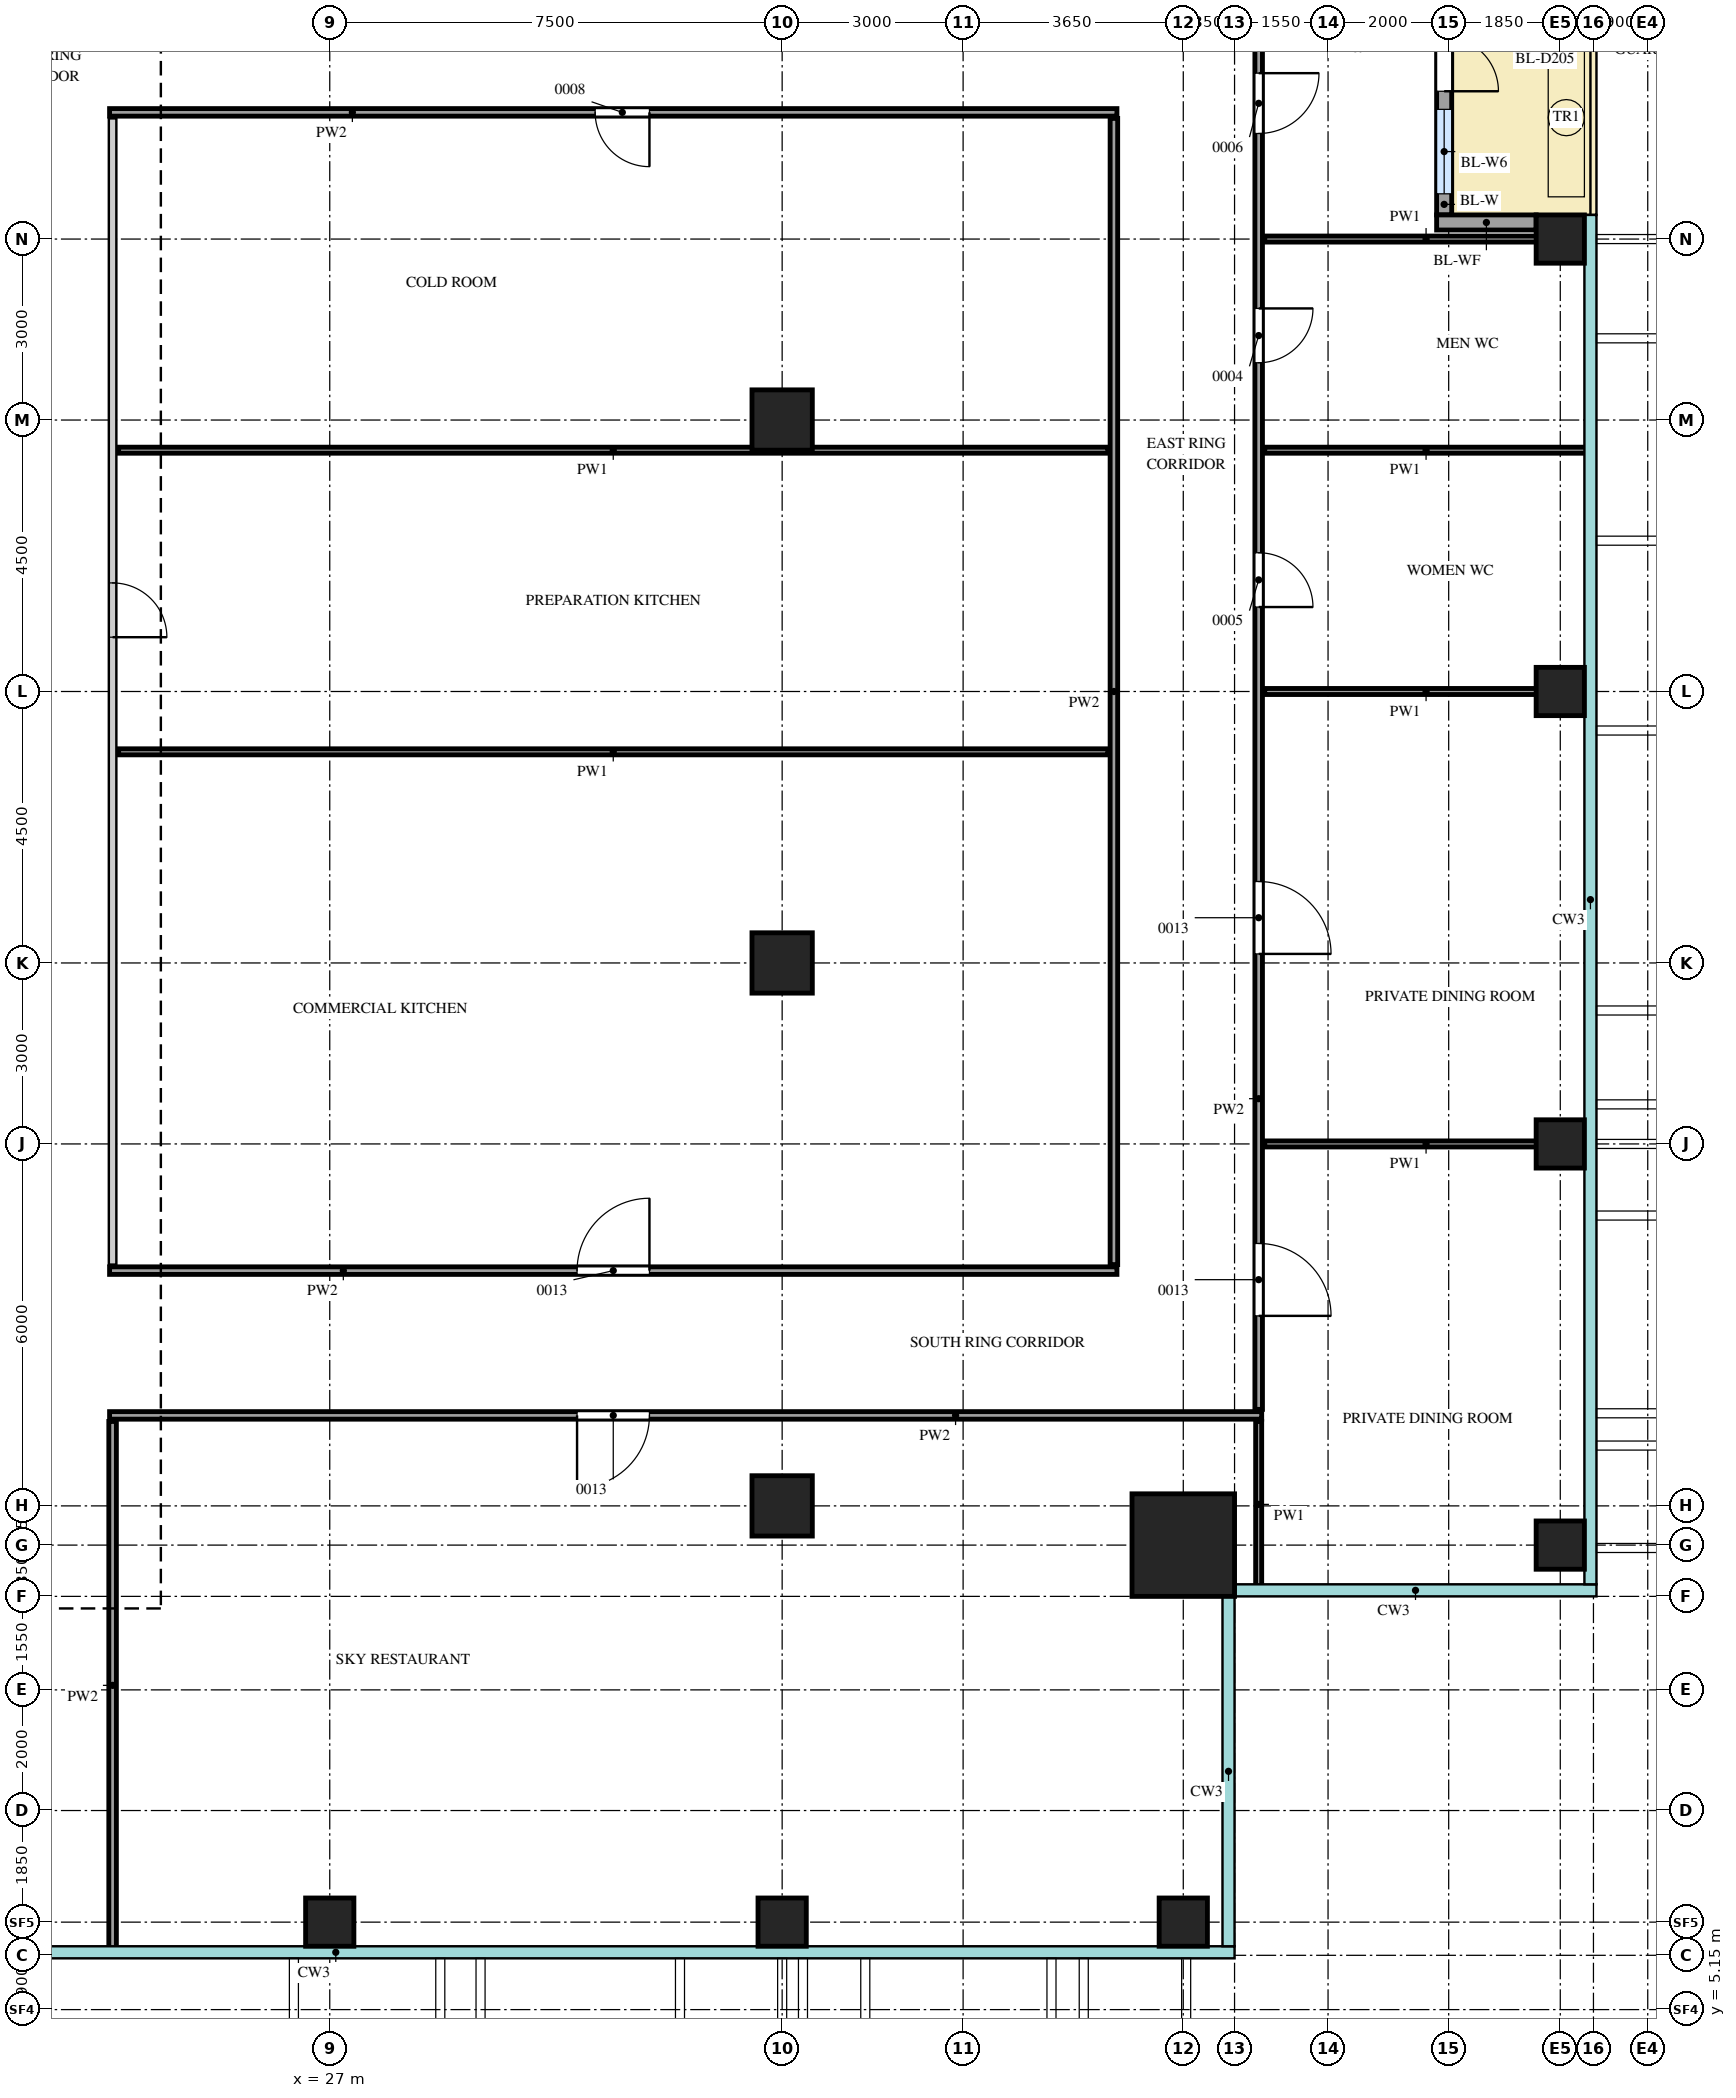
"""IFC4 building model, lengths in metres.
Left out: names, types, materials, properties, quantities, classifications, styles, units other than length and angle.
Written with IfcOpenShell. Run it as: python <this file> out.ifc"""

import sys

from ifc_helpers import new_model, si_unit, direction, frame, frame_2d, origin, origin_2d, place, context, subcontext, project, spatial, rectangle, extrude, source, transform, mapped, element, fill, save


model = new_model("IFC4")
c1 = context("Model", 3, precision=1e-05, world=origin(), true_north=direction((0.0, 1.0)))
c2 = subcontext(c1, "Body", "Model", "MODEL_VIEW")
j1 = project(units=[si_unit("LENGTHUNIT", "METRE"), si_unit("PLANEANGLEUNIT", "RADIAN")], contexts=[c1])
p1 = place(None, origin())
s1 = spatial("IfcSite", under=j1, at=p1, CompositionType="ELEMENT")
p2 = place(p1, origin())
s2 = spatial("IfcBuilding", under=s1, at=p2, CompositionType="ELEMENT")
p3 = place(p2, frame((0.0, 0.0, 306.2)))
s3 = spatial("IfcBuildingStorey", under=s2, at=p3, CompositionType="ELEMENT", Elevation=306.2)
m1 = source(origin(), c2, "Body", "SweptSolid", [
    extrude(rectangle(XDim=1.7, YDim=1.7, at=origin_2d()), origin(), (0.0, 0.0, 1.0), 3.75),
])
p4 = place(p3, frame((41.15, 12.85, 0.0), z_axis=(0.0, 0.0, 1.0), x_axis=(1.0, 0.0, 0.0)))
e1 = element("IfcColumn", 1, at=p4, inside=s3, PredefinedType="COLUMN", context=c2, shape_type="MappedRepresentation", body=[
    mapped(m1, transform((0.0, 0.0, 0.0))),
])
m2 = source(origin(), c2, "Body", "SweptSolid", [
    extrude(rectangle(XDim=0.8, YDim=0.8, at=origin_2d()), origin(), (0.0, 0.0, 1.0), 3.75),
])
for number, where, z_axis, x_axis in (
    (2, (27.0, 6.6, 0.0), (0.0, 0.0, 1.0), (1.0, 0.0, 0.0)),
    (3, (34.5, 6.6, 0.0), (0.0, 0.0, 1.0), (1.0, 0.0, 0.0)),
    (4, (41.15, 6.6, 0.0), (0.0, 0.0, 1.0), (1.0, 0.0, 0.0)),
    (5, (47.4, 12.85, 0.0), (0.0, 0.0, 1.0), (1.0, 0.0, 0.0)),
    (6, (47.4, 19.5, 0.0), (0.0, 0.0, 1.0), (1.0, 0.0, 0.0)),
    (7, (47.4, 27.0, 0.0), (0.0, 0.0, 1.0), (1.0, 0.0, 0.0)),
    (8, (47.4, 34.5, 0.0), (0.0, 0.0, 1.0), (1.0, 0.0, 0.0)),
):
    element("IfcColumn", number, at=place(p3, frame(where, z_axis=z_axis, x_axis=x_axis)), inside=s3, PredefinedType="COLUMN", context=c2, shape_type="MappedRepresentation", body=[
        mapped(m2, transform((0.0, 0.0, 0.0))),
    ])
m3 = source(origin(), c2, "Body", "SweptSolid", [
    extrude(rectangle(XDim=1.0, YDim=1.0, at=origin_2d()), origin(), (0.0, 0.0, 1.0), 3.75),
])
for number, where, z_axis, x_axis in (
    (9, (34.5, 13.5, 0.0), (0.0, 0.0, 1.0), (1.0, 0.0, 0.0)),
    (10, (34.5, 22.5, 0.0), (0.0, 0.0, 1.0), (1.0, 0.0, 0.0)),
    (11, (34.5, 31.5, 0.0), (0.0, 0.0, 1.0), (1.0, 0.0, 0.0)),
):
    element("IfcColumn", number, at=place(p3, frame(where, z_axis=z_axis, x_axis=x_axis)), inside=s3, PredefinedType="COLUMN", context=c2, shape_type="MappedRepresentation", body=[
        mapped(m3, transform((0.0, 0.0, 0.0))),
    ])
m4 = source(origin(), c2, "Body", "SweptSolid", [
    extrude(rectangle(XDim=5.85, YDim=0.25, at=frame_2d((2.925, 0.0))), origin(), (0.0, 0.0, 1.0), 3.75),
])
p5 = place(p3, frame((45.475, 34.9, 0.0), z_axis=(0.0, 0.0, 1.0), x_axis=(0.0, 1.0, 0.0)))
e12 = element("IfcWall", 12, at=p5, inside=s3, PredefinedType="SOLIDWALL", context=c2, shape_type="MappedRepresentation", body=[
    mapped(m4, transform((0.0, 0.0, 0.0))),
])
m5 = source(origin(), c2, "Body", "SweptSolid", [
    extrude(rectangle(XDim=1.4, YDim=2.4, at=frame_2d((0.7, 1.2))), frame((0.0, 0.135, 0.0), z_axis=(0.0, -1.0, 0.0), x_axis=(1.0, 0.0, 0.0)), (0.0, 0.0, 1.0), 0.27),
])
p6 = place(p5, frame((0.35, 0.0, 0.0)))
e13 = element("IfcOpeningElement", 13, at=p6, cuts=e12, PredefinedType="OPENING", context=c2, shape_type="MappedRepresentation", body=[
    mapped(m5, transform((0.0, 0.0, 0.0))),
])
p7 = place(p5, frame((4.15, 0.0, 0.0)))
e14 = element("IfcOpeningElement", 14, at=p7, cuts=e12, PredefinedType="OPENING", context=c2, shape_type="MappedRepresentation", body=[
    mapped(m5, transform((0.0, 0.0, 0.0))),
])
m6 = source(origin(), c2, "Body", "SweptSolid", [
    extrude(rectangle(XDim=1.8, YDim=2.4, at=frame_2d((0.9, 1.2))), frame((0.0, 0.135, 0.0), z_axis=(0.0, -1.0, 0.0), x_axis=(1.0, 0.0, 0.0)), (0.0, 0.0, 1.0), 0.27),
])
p8 = place(p5, frame((2.05, 0.0, 0.0)))
e15 = element("IfcOpeningElement", 15, at=p8, cuts=e12, PredefinedType="OPENING", context=c2, shape_type="MappedRepresentation", body=[
    mapped(m6, transform((0.0, 0.0, 0.0))),
])
m7 = source(origin(), c2, "Body", "SweptSolid", [
    extrude(rectangle(XDim=1.65, YDim=0.25, at=frame_2d((0.825, 0.0))), origin(), (0.0, 0.0, 1.0), 3.45),
])
p9 = place(p3, frame((47.0, 34.775, 0.0), z_axis=(0.0, 0.0, 1.0), x_axis=(-1.0, 0.0, 0.0)))
e16 = element("IfcWall", 16, at=p9, inside=s3, PredefinedType="SOLIDWALL", context=c2, shape_type="MappedRepresentation", body=[
    mapped(m7, transform((0.0, 0.0, 0.0))),
])
m8 = source(origin(), c2, "Body", "SweptSolid", [
    extrude(rectangle(XDim=8.75, YDim=0.125, at=frame_2d((4.375, 0.0))), origin(), (0.0, 0.0, 1.0), 3.8),
])
p10 = place(p3, frame((23.4, 6.15, 0.0), z_axis=(0.0, 0.0, 1.0), x_axis=(0.0, 1.0, 0.0)))
e17 = element("IfcWall", 17, at=p10, inside=s3, PredefinedType="PARTITIONING", context=c2, shape_type="MappedRepresentation", body=[
    mapped(m8, transform((0.0, 0.0, 0.0))),
])
m9 = source(origin(), c2, "Body", "SweptSolid", [
    extrude(rectangle(XDim=2.75, YDim=0.1, at=frame_2d((1.375, 0.0))), origin(), (0.0, 0.0, 1.0), 3.8),
])
p11 = place(p3, frame((42.4, 12.15, 0.0), z_axis=(0.0, 0.0, 1.0), x_axis=(0.0, 1.0, 0.0)))
e18 = element("IfcWall", 18, at=p11, inside=s3, PredefinedType="PARTITIONING", context=c2, shape_type="MappedRepresentation", body=[
    mapped(m9, transform((0.0, 0.0, 0.0))),
])
m10 = source(origin(), c2, "Body", "SweptSolid", [
    extrude(rectangle(XDim=19.1, YDim=0.125, at=frame_2d((9.55, 0.0))), origin(), (0.0, 0.0, 1.0), 3.8),
])
p12 = place(p3, frame((23.35, 15.0, 0.0), z_axis=(0.0, 0.0, 1.0), x_axis=(1.0, 0.0, 0.0)))
e19 = element("IfcWall", 19, at=p12, inside=s3, PredefinedType="PARTITIONING", context=c2, shape_type="MappedRepresentation", body=[
    mapped(m10, transform((0.0, 0.0, 0.0))),
])
m11 = source(origin(), c2, "Body", "SweptSolid", [
    extrude(rectangle(XDim=1.2, YDim=2.1, at=frame_2d((0.6, 1.05))), frame((0.0, 0.073, 0.0), z_axis=(0.0, -1.0, 0.0), x_axis=(1.0, 0.0, 0.0)), (0.0, 0.0, 1.0), 0.145),
])
p13 = place(p12, frame((7.75, 0.0, 0.0)))
e20 = element("IfcOpeningElement", 20, at=p13, cuts=e19, PredefinedType="OPENING", context=c2, shape_type="MappedRepresentation", body=[
    mapped(m11, transform((0.0, 0.0, 0.0))),
])
m12 = source(origin(), c2, "Body", "SweptSolid", [
    extrude(rectangle(XDim=23.8, YDim=0.125, at=frame_2d((11.9, 0.0))), origin(), (0.0, 0.0, 1.0), 3.8),
])
p14 = place(p3, frame((42.4, 15.1, 0.0), z_axis=(0.0, 0.0, 1.0), x_axis=(0.0, 1.0, 0.0)))
e21 = element("IfcWall", 21, at=p14, inside=s3, PredefinedType="PARTITIONING", context=c2, shape_type="MappedRepresentation", body=[
    mapped(m12, transform((0.0, 0.0, 0.0))),
])
p15 = place(p14, frame((1.55, 0.0, 0.0)))
e22 = element("IfcOpeningElement", 22, at=p15, cuts=e21, PredefinedType="OPENING", context=c2, shape_type="MappedRepresentation", body=[
    mapped(m11, transform((0.0, 0.0, 0.0))),
])
p16 = place(p14, frame((7.55, 0.0, 0.0)))
e23 = element("IfcOpeningElement", 23, at=p16, cuts=e21, PredefinedType="OPENING", context=c2, shape_type="MappedRepresentation", body=[
    mapped(m11, transform((0.0, 0.0, 0.0))),
])
m13 = source(origin(), c2, "Body", "SweptSolid", [
    extrude(rectangle(XDim=0.9, YDim=2.1, at=frame_2d((0.45, 1.05))), frame((0.0, 0.073, 0.0), z_axis=(0.0, -1.0, 0.0), x_axis=(1.0, 0.0, 0.0)), (0.0, 0.0, 1.0), 0.145),
])
p17 = place(p14, frame((13.3, 0.0, 0.0)))
e24 = element("IfcOpeningElement", 24, at=p17, cuts=e21, PredefinedType="OPENING", context=c2, shape_type="MappedRepresentation", body=[
    mapped(m13, transform((0.0, 0.0, 0.0))),
])
p18 = place(p14, frame((17.35, 0.0, 0.0)))
e25 = element("IfcOpeningElement", 25, at=p18, cuts=e21, PredefinedType="OPENING", context=c2, shape_type="MappedRepresentation", body=[
    mapped(m13, transform((0.0, 0.0, 0.0))),
])
m14 = source(origin(), c2, "Body", "SweptSolid", [
    extrude(rectangle(XDim=1.0, YDim=2.1, at=frame_2d((0.5, 1.05))), frame((0.0, 0.073, 0.0), z_axis=(0.0, -1.0, 0.0), x_axis=(1.0, 0.0, 0.0)), (0.0, 0.0, 1.0), 0.145),
])
p19 = place(p14, frame((21.15, 0.0, 0.0)))
e26 = element("IfcOpeningElement", 26, at=p19, cuts=e21, PredefinedType="OPENING", context=c2, shape_type="MappedRepresentation", body=[
    mapped(m14, transform((0.0, 0.0, 0.0))),
])
m15 = source(origin(), c2, "Body", "SweptSolid", [
    extrude(rectangle(XDim=16.7, YDim=0.125, at=frame_2d((8.35, 0.0))), origin(), (0.0, 0.0, 1.0), 3.8),
])
p20 = place(p3, frame((23.35, 17.4, 0.0), z_axis=(0.0, 0.0, 1.0), x_axis=(1.0, 0.0, 0.0)))
e27 = element("IfcWall", 27, at=p20, inside=s3, PredefinedType="PARTITIONING", context=c2, shape_type="MappedRepresentation", body=[
    mapped(m15, transform((0.0, 0.0, 0.0))),
])
p21 = place(p20, frame((7.75, 0.0, 0.0)))
e28 = element("IfcOpeningElement", 28, at=p21, cuts=e27, PredefinedType="OPENING", context=c2, shape_type="MappedRepresentation", body=[
    mapped(m11, transform((0.0, 0.0, 0.0))),
])
m16 = source(origin(), c2, "Body", "SweptSolid", [
    extrude(rectangle(XDim=19.0, YDim=0.125, at=frame_2d((9.5, 0.0))), origin(), (0.0, 0.0, 1.0), 3.8),
])
p22 = place(p3, frame((23.4, 17.5, 0.0), z_axis=(0.0, 0.0, 1.0), x_axis=(0.0, 1.0, 0.0)))
e29 = element("IfcWall", 29, at=p22, inside=s3, PredefinedType="PARTITIONING", context=c2, shape_type="MappedRepresentation", body=[
    mapped(m16, transform((0.0, 0.0, 0.0))),
])
p23 = place(p22, frame((10.4, 0.0, 0.0)))
e30 = element("IfcOpeningElement", 30, at=p23, cuts=e29, PredefinedType="OPENING", context=c2, shape_type="MappedRepresentation", body=[
    mapped(m13, transform((0.0, 0.0, 0.0))),
])
p24 = place(p3, frame((40.0, 17.5, 0.0), z_axis=(0.0, 0.0, 1.0), x_axis=(0.0, 1.0, 0.0)))
e31 = element("IfcWall", 31, at=p24, inside=s3, PredefinedType="PARTITIONING", context=c2, shape_type="MappedRepresentation", body=[
    mapped(m16, transform((0.0, 0.0, 0.0))),
])
m17 = source(origin(), c2, "Body", "SweptSolid", [
    extrude(rectangle(XDim=5.35, YDim=0.1, at=frame_2d((2.675, 0.0))), origin(), (0.0, 0.0, 1.0), 3.8),
])
p25 = place(p3, frame((42.5, 19.5, 0.0), z_axis=(0.0, 0.0, 1.0), x_axis=(1.0, 0.0, 0.0)))
e32 = element("IfcWall", 32, at=p25, inside=s3, PredefinedType="PARTITIONING", context=c2, shape_type="MappedRepresentation", body=[
    mapped(m17, transform((0.0, 0.0, 0.0))),
])
m18 = source(origin(), c2, "Body", "SweptSolid", [
    extrude(rectangle(XDim=16.4, YDim=0.1, at=frame_2d((8.2, 0.0))), origin(), (0.0, 0.0, 1.0), 3.8),
])
p26 = place(p3, frame((23.5, 26.0, 0.0), z_axis=(0.0, 0.0, 1.0), x_axis=(1.0, 0.0, 0.0)))
e33 = element("IfcWall", 33, at=p26, inside=s3, PredefinedType="PARTITIONING", context=c2, shape_type="MappedRepresentation", body=[
    mapped(m18, transform((0.0, 0.0, 0.0))),
])
p27 = place(p3, frame((42.5, 27.0, 0.0), z_axis=(0.0, 0.0, 1.0), x_axis=(1.0, 0.0, 0.0)))
e34 = element("IfcWall", 34, at=p27, inside=s3, PredefinedType="PARTITIONING", context=c2, shape_type="MappedRepresentation", body=[
    mapped(m17, transform((0.0, 0.0, 0.0))),
])
p28 = place(p3, frame((23.5, 31.0, 0.0), z_axis=(0.0, 0.0, 1.0), x_axis=(1.0, 0.0, 0.0)))
e35 = element("IfcWall", 35, at=p28, inside=s3, PredefinedType="PARTITIONING", context=c2, shape_type="MappedRepresentation", body=[
    mapped(m18, transform((0.0, 0.0, 0.0))),
])
for number, where, z_axis, x_axis in (
    (36, (42.5, 31.0, 0.0), (0.0, 0.0, 1.0), (1.0, 0.0, 0.0)),
    (37, (42.5, 34.5, 0.0), (0.0, 0.0, 1.0), (1.0, 0.0, 0.0)),
):
    element("IfcWall", number, at=place(p3, frame(where, z_axis=z_axis, x_axis=x_axis)), inside=s3, PredefinedType="PARTITIONING", context=c2, shape_type="MappedRepresentation", body=[
        mapped(m17, transform((0.0, 0.0, 0.0))),
    ])
p29 = place(p3, frame((23.35, 36.6, 0.0), z_axis=(0.0, 0.0, 1.0), x_axis=(1.0, 0.0, 0.0)))
e38 = element("IfcWall", 38, at=p29, inside=s3, PredefinedType="PARTITIONING", context=c2, shape_type="MappedRepresentation", body=[
    mapped(m15, transform((0.0, 0.0, 0.0))),
])
p30 = place(p29, frame((8.05, 0.0, 0.0)))
e39 = element("IfcOpeningElement", 39, at=p30, cuts=e38, PredefinedType="OPENING", context=c2, shape_type="MappedRepresentation", body=[
    mapped(m13, transform((0.0, 0.0, 0.0))),
])
m19 = source(origin(), c2, "Body", "SweptSolid", [
    extrude(rectangle(XDim=1.4, YDim=2.4, at=frame_2d((0.7, 1.2))), frame((0.0, 0.03, 0.0), z_axis=(0.0, -1.0, 0.0), x_axis=(1.0, 0.0, 0.0)), (0.0, 0.0, 1.0), 0.06),
])
p31 = place(p6, origin())
e40 = element("IfcWindow", 40, at=p31, inside=s3, PartitioningType="SINGLE_PANEL", PredefinedType="WINDOW", context=c2, shape_type="MappedRepresentation", body=[
    mapped(m19, transform((0.0, 0.0, 0.0))),
])
fill(e13, e40)
m20 = source(origin(), c2, "Body", "SweptSolid", [
    extrude(rectangle(XDim=1.8, YDim=2.4, at=frame_2d((0.9, 1.2))), frame((0.0, 0.025, 0.0), z_axis=(0.0, -1.0, 0.0), x_axis=(1.0, 0.0, 0.0)), (0.0, 0.0, 1.0), 0.05),
])
p32 = place(p8, origin())
e41 = element("IfcDoor", 41, at=p32, inside=s3, OperationType="DOUBLE_DOOR_DOUBLE_SWING", PredefinedType="DOOR", context=c2, shape_type="MappedRepresentation", body=[
    mapped(m20, transform((0.0, 0.0, 0.0))),
])
fill(e15, e41)
m21 = source(origin(), c2, "Body", "SweptSolid", [
    extrude(rectangle(XDim=1.2, YDim=2.1, at=frame_2d((0.6, 1.05))), frame((0.0, 0.025, 0.0), z_axis=(0.0, -1.0, 0.0), x_axis=(1.0, 0.0, 0.0)), (0.0, 0.0, 1.0), 0.05),
])
p33 = place(p13, origin())
e42 = element("IfcDoor", 42, at=p33, inside=s3, OperationType="SINGLE_SWING_LEFT", PredefinedType="DOOR", context=c2, shape_type="MappedRepresentation", body=[
    mapped(m21, transform((0.0, 0.0, 0.0))),
])
fill(e20, e42)
p34 = place(p15, origin())
e43 = element("IfcDoor", 43, at=p34, inside=s3, OperationType="SINGLE_SWING_LEFT", PredefinedType="DOOR", context=c2, shape_type="MappedRepresentation", body=[
    mapped(m21, transform((0.0, 0.0, 0.0))),
])
fill(e22, e43)
p35 = place(p16, origin())
e44 = element("IfcDoor", 44, at=p35, inside=s3, OperationType="SINGLE_SWING_LEFT", PredefinedType="DOOR", context=c2, shape_type="MappedRepresentation", body=[
    mapped(m21, transform((0.0, 0.0, 0.0))),
])
fill(e23, e44)
m22 = source(origin(), c2, "Body", "SweptSolid", [
    extrude(rectangle(XDim=0.9, YDim=2.1, at=frame_2d((0.45, 1.05))), frame((0.0, 0.025, 0.0), z_axis=(0.0, -1.0, 0.0), x_axis=(1.0, 0.0, 0.0)), (0.0, 0.0, 1.0), 0.05),
])
p36 = place(p17, origin())
e45 = element("IfcDoor", 45, at=p36, inside=s3, OperationType="SINGLE_SWING_LEFT", PredefinedType="DOOR", context=c2, shape_type="MappedRepresentation", body=[
    mapped(m22, transform((0.0, 0.0, 0.0))),
])
fill(e24, e45)
p37 = place(p18, origin())
e46 = element("IfcDoor", 46, at=p37, inside=s3, OperationType="SINGLE_SWING_RIGHT", PredefinedType="DOOR", context=c2, shape_type="MappedRepresentation", body=[
    mapped(m22, transform((0.0, 0.0, 0.0))),
])
fill(e25, e46)
m23 = source(origin(), c2, "Body", "SweptSolid", [
    extrude(rectangle(XDim=1.0, YDim=2.1, at=frame_2d((0.5, 1.05))), frame((0.0, 0.025, 0.0), z_axis=(0.0, -1.0, 0.0), x_axis=(1.0, 0.0, 0.0)), (0.0, 0.0, 1.0), 0.05),
])
p38 = place(p19, origin())
e47 = element("IfcDoor", 47, at=p38, inside=s3, OperationType="SINGLE_SWING_RIGHT", PredefinedType="DOOR", context=c2, shape_type="MappedRepresentation", body=[
    mapped(m23, transform((0.0, 0.0, 0.0))),
])
fill(e26, e47)
p39 = place(p21, origin())
e48 = element("IfcDoor", 48, at=p39, inside=s3, OperationType="SINGLE_SWING_LEFT", PredefinedType="DOOR", context=c2, shape_type="MappedRepresentation", body=[
    mapped(m21, transform((0.0, 0.0, 0.0))),
])
fill(e28, e48)
p40 = place(p23, origin())
e49 = element("IfcDoor", 49, at=p40, inside=s3, OperationType="SINGLE_SWING_LEFT", PredefinedType="DOOR", context=c2, shape_type="MappedRepresentation", body=[
    mapped(m22, transform((0.0, 0.0, 0.0))),
])
fill(e30, e49)
p41 = place(p30, origin())
e50 = element("IfcDoor", 50, at=p41, inside=s3, OperationType="SINGLE_SWING_RIGHT", PredefinedType="DOOR", context=c2, shape_type="MappedRepresentation", body=[
    mapped(m22, transform((0.0, 0.0, 0.0))),
])
fill(e39, e50)
save(model, sys.argv[1])
